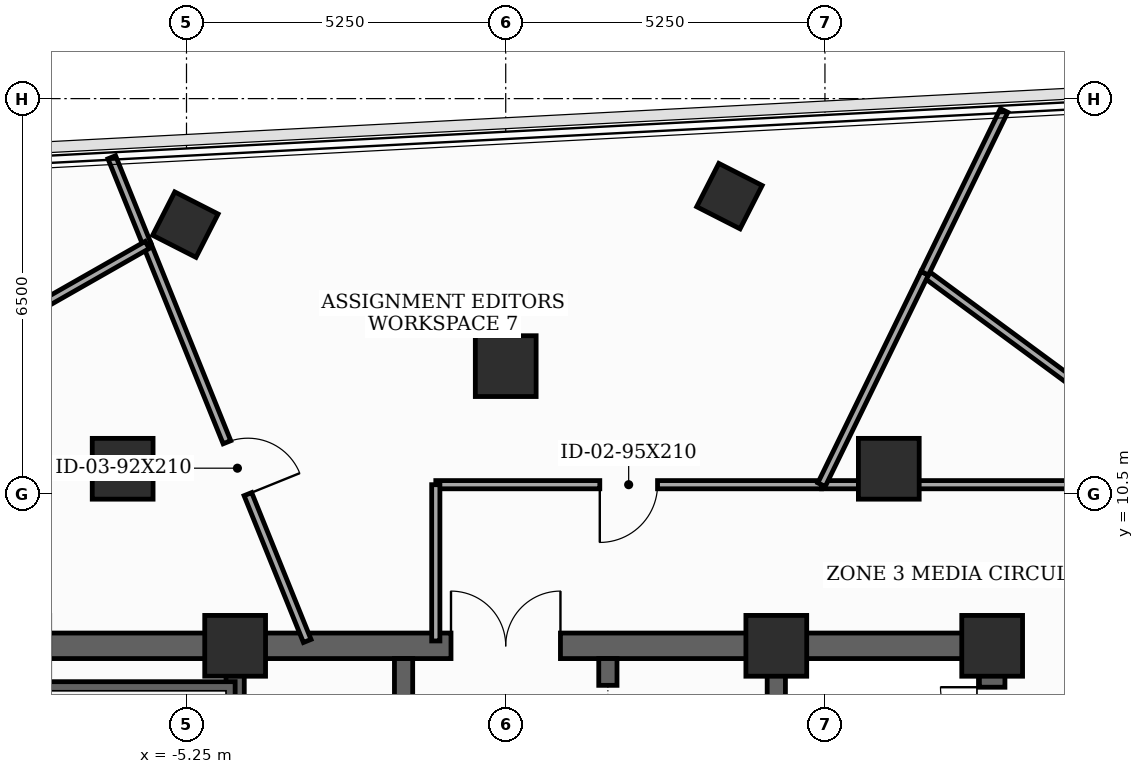
"""IFC4 building model, lengths in metres.
Left out: names, types, materials, properties, quantities, classifications, styles, units other than length and angle.
Written with IfcOpenShell. Run it as: python <this file> out.ifc"""

import sys

from ifc_helpers import new_model, si_unit, direction, frame, frame_2d, origin, origin_2d, place, context, subcontext, project, spatial, rectangle, extrude, element, fill, save


model = new_model("IFC4")
c1 = context("Model", 3, precision=1e-05, world=origin(), true_north=direction((0.0, 1.0)))
c2 = subcontext(c1, "Body", "Model", "MODEL_VIEW")
j1 = project(units=[si_unit("LENGTHUNIT", "METRE"), si_unit("PLANEANGLEUNIT", "RADIAN")], contexts=[c1])
p1 = place(None, origin())
s1 = spatial("IfcSite", under=j1, at=p1, CompositionType="ELEMENT")
p2 = place(p1, origin())
s2 = spatial("IfcBuilding", under=s1, at=p2, CompositionType="ELEMENT")
p3 = place(p2, frame((0.0, 0.0, 263.3)))
s3 = spatial("IfcBuildingStorey", under=s2, at=p3, CompositionType="ELEMENT", Elevation=263.3)
for number, where, z_axis, x_axis in (
    (1, (8.0, 8.0, 0.0), (0.0, 0.0, 1.0), (1.0, 0.0, 0.0)),
    (2, (4.45, 8.0, 0.0), (0.0, 0.0, 1.0), (1.0, 0.0, 0.0)),
    (3, (-4.45, 8.0, 0.0), (0.0, 0.0, 1.0), (1.0, 0.0, 0.0)),
    (4, (6.3, 10.912, 0.0), (0.0, 0.0, 1.0), (1.0, 0.0, 0.0)),
    (5, (0.0, 12.6, 0.0), (0.0, 0.0, 1.0), (1.0, 0.0, 0.0)),
    (6, (-6.3, 10.912, 0.0), (0.0, 0.0, 1.0), (1.0, 0.0, 0.0)),
):
    element("IfcColumn", number, at=place(p3, frame(where, z_axis=z_axis, x_axis=x_axis)), inside=s3, PredefinedType="COLUMN", context=c2, shape_type="SweptSolid", body=[
        extrude(rectangle(XDim=1.0, YDim=1.0, at=origin_2d()), origin(), (0.0, 0.0, 1.0), 3.7),
    ])
for number, where, z_axis, x_axis in (
    (7, (3.679, 15.396, 0.0), (0.0, 0.0, 1.0), (0.454, 0.891, 0.0)),
    (8, (-5.269, 14.927, 0.0), (0.0, 0.0, 1.0), (0.454, 0.891, 0.0)),
):
    element("IfcColumn", number, at=place(p3, frame(where, z_axis=z_axis, x_axis=x_axis)), inside=s3, PredefinedType="COLUMN", context=c2, shape_type="SweptSolid", body=[
        extrude(rectangle(XDim=0.8, YDim=0.8, at=origin_2d()), origin(), (0.0, 0.0, 1.0), 3.7),
    ])
p4 = place(p3, frame((8.0, -8.0, 0.0), z_axis=(0.0, 0.0, 1.0), x_axis=(0.0, 1.0, 0.0)))
e9 = element("IfcWall", 9, at=p4, inside=s3, PredefinedType="SHEAR", context=c2, shape_type="SweptSolid", body=[
    extrude(rectangle(XDim=16.0, YDim=0.42, at=frame_2d((8.0, 0.0))), origin(), (0.0, 0.0, 1.0), 3.5),
])
p5 = place(p4, frame((9.6, 0.0, 0.0)))
e10 = element("IfcOpeningElement", 10, at=p5, cuts=e9, PredefinedType="OPENING", context=c2, shape_type="SweptSolid", body=[
    extrude(rectangle(XDim=1.05, YDim=2.15, at=frame_2d((0.525, 1.075))), frame((0.0, 0.22, 0.0), z_axis=(0.0, -1.0, 0.0), x_axis=(1.0, 0.0, 0.0)), (0.0, 0.0, 1.0), 0.44),
])
p6 = place(p4, frame((14.469, 0.0, 0.0)))
e11 = element("IfcOpeningElement", 11, at=p6, cuts=e9, PredefinedType="OPENING", context=c2, shape_type="SweptSolid", body=[
    extrude(rectangle(XDim=0.85, YDim=2.02, at=frame_2d((0.425, 1.01))), frame((0.0, 0.22, 0.0), z_axis=(0.0, -1.0, 0.0), x_axis=(1.0, 0.0, 0.0)), (0.0, 0.0, 1.0), 0.44),
])
p7 = place(p3, frame((-8.0, 8.0, 0.0), z_axis=(0.0, 0.0, 1.0), x_axis=(1.0, 0.0, 0.0)))
e12 = element("IfcWall", 12, at=p7, inside=s3, PredefinedType="SHEAR", context=c2, shape_type="SweptSolid", body=[
    extrude(rectangle(XDim=16.0, YDim=0.42, at=frame_2d((8.0, 0.0))), origin(), (0.0, 0.0, 1.0), 3.5),
])
p8 = place(p7, frame((7.1, 0.0, 0.0)))
e13 = element("IfcOpeningElement", 13, at=p8, cuts=e12, PredefinedType="OPENING", context=c2, shape_type="SweptSolid", body=[
    extrude(rectangle(XDim=1.8, YDim=2.15, at=frame_2d((0.9, 1.075))), frame((0.0, 0.22, 0.0), z_axis=(0.0, -1.0, 0.0), x_axis=(1.0, 0.0, 0.0)), (0.0, 0.0, 1.0), 0.44),
])
for number, where, z_axis, x_axis in (
    (14, (-4.45, -7.79, 0.0), (0.0, 0.0, 1.0), (0.0, 1.0, 0.0)),
    (15, (4.45, -7.79, 0.0), (0.0, 0.0, 1.0), (0.0, 1.0, 0.0)),
):
    element("IfcWall", number, at=place(p3, frame(where, z_axis=z_axis, x_axis=x_axis)), inside=s3, PredefinedType="SHEAR", context=c2, shape_type="SweptSolid", body=[
        extrude(rectangle(XDim=15.58, YDim=0.3, at=frame_2d((7.79, 0.0))), origin(), (0.0, 0.0, 1.0), 3.5),
    ])
p9 = place(p3, frame((-7.79, 7.26, 0.0), z_axis=(0.0, 0.0, 1.0), x_axis=(1.0, 0.0, 0.0)))
e16 = element("IfcWall", 16, at=p9, inside=s3, PredefinedType="SHEAR", context=c2, shape_type="SweptSolid", body=[
    extrude(rectangle(XDim=3.34, YDim=0.3, at=frame_2d((1.67, 0.0))), origin(), (0.0, 0.0, 1.0), 3.5),
])
p10 = place(p3, frame((-1.68, -4.85, 0.0), z_axis=(0.0, 0.0, 1.0), x_axis=(0.0, 1.0, 0.0)))
e17 = element("IfcWall", 17, at=p10, inside=s3, PredefinedType="SHEAR", context=c2, shape_type="SweptSolid", body=[
    extrude(rectangle(XDim=12.64, YDim=0.3, at=frame_2d((6.32, 0.0))), origin(), (0.0, 0.0, 1.0), 3.5),
])
p11 = place(p10, frame((3.5, 0.0, 0.0)))
e18 = element("IfcOpeningElement", 18, at=p11, cuts=e17, PredefinedType="OPENING", context=c2, shape_type="SweptSolid", body=[
    extrude(rectangle(XDim=0.95, YDim=2.1, at=frame_2d((0.475, 1.05))), frame((0.0, 0.16, 0.0), z_axis=(0.0, -1.0, 0.0), x_axis=(1.0, 0.0, 0.0)), (0.0, 0.0, 1.0), 0.32),
])
p12 = place(p10, frame((9.8, 0.0, 0.0)))
e19 = element("IfcOpeningElement", 19, at=p12, cuts=e17, PredefinedType="OPENING", context=c2, shape_type="SweptSolid", body=[
    extrude(rectangle(XDim=0.95, YDim=2.1, at=frame_2d((0.475, 1.05))), frame((0.0, 0.16, 0.0), z_axis=(0.0, -1.0, 0.0), x_axis=(1.0, 0.0, 0.0)), (0.0, 0.0, 1.0), 0.32),
])
p13 = place(p3, frame((1.68, -4.85, 0.0), z_axis=(0.0, 0.0, 1.0), x_axis=(0.0, 1.0, 0.0)))
e20 = element("IfcWall", 20, at=p13, inside=s3, PredefinedType="SHEAR", context=c2, shape_type="SweptSolid", body=[
    extrude(rectangle(XDim=12.64, YDim=0.3, at=frame_2d((6.32, 0.0))), origin(), (0.0, 0.0, 1.0), 3.5),
])
p14 = place(p13, frame((0.55, 0.0, 0.0)))
e21 = element("IfcOpeningElement", 21, at=p14, cuts=e20, PredefinedType="OPENING", context=c2, shape_type="SweptSolid", body=[
    extrude(rectangle(XDim=1.1, YDim=2.1, at=frame_2d((0.55, 1.05))), frame((0.0, 0.16, 0.0), z_axis=(0.0, -1.0, 0.0), x_axis=(1.0, 0.0, 0.0)), (0.0, 0.0, 1.0), 0.32),
])
p15 = place(p13, frame((2.65, 0.0, 0.0)))
e22 = element("IfcOpeningElement", 22, at=p15, cuts=e20, PredefinedType="OPENING", context=c2, shape_type="SweptSolid", body=[
    extrude(rectangle(XDim=1.1, YDim=2.1, at=frame_2d((0.55, 1.05))), frame((0.0, 0.16, 0.0), z_axis=(0.0, -1.0, 0.0), x_axis=(1.0, 0.0, 0.0)), (0.0, 0.0, 1.0), 0.32),
])
p16 = place(p13, frame((4.75, 0.0, 0.0)))
e23 = element("IfcOpeningElement", 23, at=p16, cuts=e20, PredefinedType="OPENING", context=c2, shape_type="SweptSolid", body=[
    extrude(rectangle(XDim=1.1, YDim=2.1, at=frame_2d((0.55, 1.05))), frame((0.0, 0.16, 0.0), z_axis=(0.0, -1.0, 0.0), x_axis=(1.0, 0.0, 0.0)), (0.0, 0.0, 1.0), 0.32),
])
p17 = place(p13, frame((8.2, 0.0, 0.0)))
e24 = element("IfcOpeningElement", 24, at=p17, cuts=e20, PredefinedType="OPENING", context=c2, shape_type="SweptSolid", body=[
    extrude(rectangle(XDim=0.95, YDim=2.1, at=frame_2d((0.475, 1.05))), frame((0.0, 0.16, 0.0), z_axis=(0.0, -1.0, 0.0), x_axis=(1.0, 0.0, 0.0)), (0.0, 0.0, 1.0), 0.32),
])
p18 = place(p13, frame((11.25, 0.0, 0.0)))
e25 = element("IfcOpeningElement", 25, at=p18, cuts=e20, PredefinedType="OPENING", context=c2, shape_type="SweptSolid", body=[
    extrude(rectangle(XDim=0.95, YDim=2.1, at=frame_2d((0.475, 1.05))), frame((0.0, 0.16, 0.0), z_axis=(0.0, -1.0, 0.0), x_axis=(1.0, 0.0, 0.0)), (0.0, 0.0, 1.0), 0.32),
])
p19 = place(p3, frame((10.15, 10.65, 0.0), z_axis=(0.0, 0.0, 1.0), x_axis=(-1.0, 0.0, 0.0)))
e26 = element("IfcWall", 26, at=p19, inside=s3, PredefinedType="PARTITIONING", context=c2, shape_type="SweptSolid", body=[
    extrude(rectangle(XDim=4.956, YDim=0.135, at=frame_2d((2.478, 0.0))), origin(), (0.0, 0.0, 1.0), 2.885),
])
p20 = place(p3, frame((5.194, 10.65, 0.0), z_axis=(0.0, 0.0, 1.0), x_axis=(-1.0, 0.0, 0.0)))
e27 = element("IfcWall", 27, at=p20, inside=s3, PredefinedType="PARTITIONING", context=c2, shape_type="SweptSolid", body=[
    extrude(rectangle(XDim=6.344, YDim=0.135, at=frame_2d((3.172, 0.0))), origin(), (0.0, 0.0, 1.0), 2.885),
])
p21 = place(p20, frame((2.697, 0.0, 0.0)))
e28 = element("IfcOpeningElement", 28, at=p21, cuts=e27, PredefinedType="OPENING", context=c2, shape_type="SweptSolid", body=[
    extrude(rectangle(XDim=0.95, YDim=2.1, at=frame_2d((0.475, 1.05))), frame((0.0, 0.077, 0.0), z_axis=(0.0, -1.0, 0.0), x_axis=(1.0, 0.0, 0.0)), (0.0, 0.0, 1.0), 0.155),
])
p22 = place(p3, frame((-1.15, 10.65, 0.0), z_axis=(0.0, 0.0, 1.0), x_axis=(0.0, -1.0, 0.0)))
e29 = element("IfcWall", 29, at=p22, inside=s3, PredefinedType="PARTITIONING", context=c2, shape_type="SweptSolid", body=[
    extrude(rectangle(XDim=2.57, YDim=0.135, at=frame_2d((1.285, 0.0))), origin(), (0.0, 0.0, 1.0), 2.885),
])
p23 = place(p3, frame((11.788, 10.521, 0.0), z_axis=(0.0, 0.0, 1.0), x_axis=(-0.805162772786, 0.593053883993, 0.0)))
e30 = element("IfcWall", 30, at=p23, inside=s3, PredefinedType="PARTITIONING", context=c2, shape_type="SweptSolid", body=[
    extrude(rectangle(XDim=6.082, YDim=0.135, at=frame_2d((3.041, 0.0))), origin(), (0.0, 0.0, 1.0), 3.035),
])
p24 = place(p3, frame((6.891, 14.128, 0.0), z_axis=(0.0, 0.0, 1.0), x_axis=(-0.438511877771, -0.898725393573, 0.0)))
e31 = element("IfcWall", 31, at=p24, inside=s3, PredefinedType="PARTITIONING", context=c2, shape_type="SweptSolid", body=[
    extrude(rectangle(XDim=3.87, YDim=0.135, at=frame_2d((1.935, 0.0))), origin(), (0.0, 0.0, 1.0), 2.885),
])
p25 = place(p3, frame((8.196, 16.805, 0.0), z_axis=(0.0, 0.0, 1.0), x_axis=(-0.438139314435, -0.898907081486, 0.0)))
e32 = element("IfcWall", 32, at=p25, inside=s3, PredefinedType="PARTITIONING", context=c2, shape_type="SweptSolid", body=[
    extrude(rectangle(XDim=2.978, YDim=0.135, at=frame_2d((1.489, 0.0))), origin(), (0.0, 0.0, 1.0), 3.035),
])
p26 = place(p3, frame((-5.896, 14.593, 0.0), z_axis=(0.0, 0.0, 1.0), x_axis=(0.374630268076, -0.927174289032, 0.0)))
e33 = element("IfcWall", 33, at=p26, inside=s3, PredefinedType="PARTITIONING", context=c2, shape_type="SweptSolid", body=[
    extrude(rectangle(XDim=7.024, YDim=0.135, at=frame_2d((3.512, 0.0))), origin(), (0.0, 0.0, 1.0), 2.885),
])
p27 = place(p26, frame((3.5, 0.0, 0.0)))
e34 = element("IfcOpeningElement", 34, at=p27, cuts=e33, PredefinedType="OPENING", context=c2, shape_type="SweptSolid", body=[
    extrude(rectangle(XDim=0.92, YDim=2.1, at=frame_2d((0.46, 1.05))), frame((0.0, 0.077, 0.0), z_axis=(0.0, -1.0, 0.0), x_axis=(1.0, 0.0, 0.0)), (0.0, 0.0, 1.0), 0.155),
])
p28 = place(p3, frame((-6.479, 16.035, 0.0), z_axis=(0.0, 0.0, 1.0), x_axis=(0.374743256905, -0.927128627217, 0.0)))
e35 = element("IfcWall", 35, at=p28, inside=s3, PredefinedType="PARTITIONING", context=c2, shape_type="SweptSolid", body=[
    extrude(rectangle(XDim=1.556, YDim=0.135, at=frame_2d((0.778, 0.0))), origin(), (0.0, 0.0, 1.0), 3.035),
])
p29 = place(p3, frame((-5.896, 14.593, 0.0), z_axis=(0.0, 0.0, 1.0), x_axis=(-0.868954887981, -0.494891303877, 0.0)))
e36 = element("IfcWall", 36, at=p29, inside=s3, PredefinedType="PARTITIONING", context=c2, shape_type="SweptSolid", body=[
    extrude(rectangle(XDim=4.617, YDim=0.135, at=frame_2d((2.309, 0.0))), origin(), (0.0, 0.0, 1.0), 3.035),
])
p30 = place(p6, origin())
e37 = element("IfcDoor", 37, at=p30, inside=s3, OperationType="SINGLE_SWING_RIGHT", PredefinedType="TRAPDOOR", context=c2, shape_type="SweptSolid", body=[
    extrude(rectangle(XDim=0.85, YDim=2.02, at=frame_2d((0.425, 1.01))), frame((0.0, 0.025, 0.0), z_axis=(0.0, -1.0, 0.0), x_axis=(1.0, 0.0, 0.0)), (0.0, 0.0, 1.0), 0.05),
])
fill(e11, e37)
p31 = place(p8, origin())
e38 = element("IfcDoor", 38, at=p31, inside=s3, OperationType="DOUBLE_DOOR_SINGLE_SWING", PredefinedType="DOOR", context=c2, shape_type="SweptSolid", body=[
    extrude(rectangle(XDim=1.8, YDim=2.15, at=frame_2d((0.9, 1.075))), frame((0.0, 0.025, 0.0), z_axis=(0.0, -1.0, 0.0), x_axis=(1.0, 0.0, 0.0)), (0.0, 0.0, 1.0), 0.05),
])
fill(e13, e38)
p32 = place(p18, origin())
e39 = element("IfcDoor", 39, at=p32, inside=s3, OperationType="SLIDING_TO_LEFT", PredefinedType="DOOR", context=c2, shape_type="SweptSolid", body=[
    extrude(rectangle(XDim=0.95, YDim=2.1, at=frame_2d((0.475, 1.05))), frame((0.0, 0.025, 0.0), z_axis=(0.0, -1.0, 0.0), x_axis=(1.0, 0.0, 0.0)), (0.0, 0.0, 1.0), 0.05),
])
fill(e25, e39)
p33 = place(p21, origin())
e40 = element("IfcDoor", 40, at=p33, inside=s3, OperationType="SINGLE_SWING_RIGHT", PredefinedType="DOOR", context=c2, shape_type="SweptSolid", body=[
    extrude(rectangle(XDim=0.95, YDim=2.1, at=frame_2d((0.475, 1.05))), frame((0.0, 0.025, 0.0), z_axis=(0.0, -1.0, 0.0), x_axis=(1.0, 0.0, 0.0)), (0.0, 0.0, 1.0), 0.05),
])
fill(e28, e40)
p34 = place(p27, origin())
e41 = element("IfcDoor", 41, at=p34, inside=s3, OperationType="SINGLE_SWING_RIGHT", PredefinedType="DOOR", context=c2, shape_type="SweptSolid", body=[
    extrude(rectangle(XDim=0.92, YDim=2.1, at=frame_2d((0.46, 1.05))), frame((0.0, 0.025, 0.0), z_axis=(0.0, -1.0, 0.0), x_axis=(1.0, 0.0, 0.0)), (0.0, 0.0, 1.0), 0.05),
])
fill(e34, e41)
save(model, sys.argv[1])
